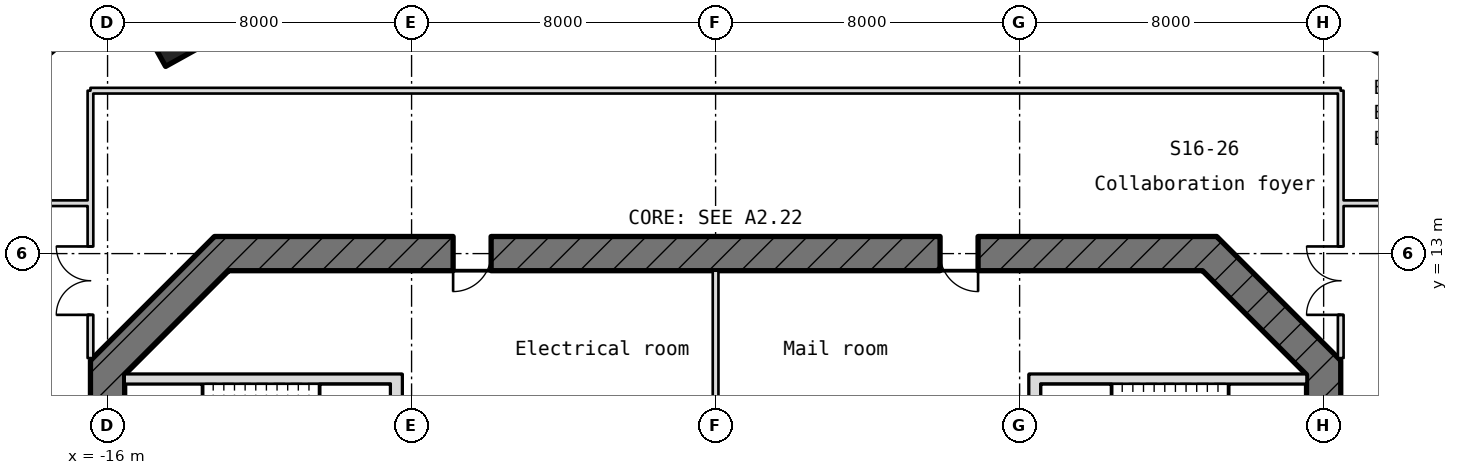
"""IFC4 building model, lengths in metres.
Left out: names, types, materials, properties, quantities, classifications, styles, units other than length and angle.
Written with IfcOpenShell. Run it as: python <this file> out.ifc"""

import sys

from ifc_helpers import new_model, si_unit, direction, frame, frame_2d, origin, origin_2d, place, context, subcontext, project, spatial, rectangle, hollow_rectangle, extrude, element, fill, save


model = new_model("IFC4")
c1 = context("Model", 3, precision=1e-05, world=origin(), true_north=direction((0.0, 1.0)))
c2 = subcontext(c1, "Body", "Model", "MODEL_VIEW")
j1 = project(units=[si_unit("LENGTHUNIT", "METRE"), si_unit("PLANEANGLEUNIT", "RADIAN")], contexts=[c1])
p1 = place(None, origin())
s1 = spatial("IfcSite", under=j1, at=p1, CompositionType="ELEMENT")
p2 = place(p1, origin())
s2 = spatial("IfcBuilding", under=s1, at=p2, CompositionType="ELEMENT")
p3 = place(p2, frame((0.0, 0.0, 235.75)))
s3 = spatial("IfcBuildingStorey", under=s2, at=p3, CompositionType="ELEMENT", Elevation=235.75)
for number, where, z_axis, x_axis in (
    (1, (17.725, 19.205, -0.18), (0.0, 0.0, 1.0), (0.874, -0.485, 0.0)),
    (2, (-14.125, 19.205, -0.18), (0.0, 0.0, 1.0), (0.874, 0.485, 0.0)),
):
    element("IfcColumn", number, at=place(p3, frame(where, z_axis=z_axis, x_axis=x_axis)), inside=s3, PredefinedType="COLUMN", context=c2, shape_type="SweptSolid", body=[
        extrude(hollow_rectangle(XDim=1.85, YDim=1.9, WallThickness=0.065, at=origin_2d()), origin(), (0.0, 0.0, 1.0), 4.15),
    ])
p4 = place(p3, frame((-15.003, 20.519, 0.0), z_axis=(0.0, 0.0, 1.0), x_axis=(-0.765786072148, -0.643095398603, 0.0)))
e3 = element("IfcWall", 3, at=p4, inside=s3, PredefinedType="SOLIDWALL", context=c2, shape_type="SweptSolid", body=[
    extrude(rectangle(XDim=10.897, YDim=0.3, at=frame_2d((5.448, 0.0))), origin(), (0.0, 0.0, 1.0), 3.97),
])
p5 = place(p4, frame((7.197, 0.0, 0.0)))
e4 = element("IfcOpeningElement", 4, at=p5, cuts=e3, PredefinedType="OPENING", context=c2, shape_type="SweptSolid", body=[
    extrude(rectangle(XDim=1.8, YDim=2.4, at=frame_2d((0.9, 1.2))), frame((0.0, 0.16, 0.0), z_axis=(0.0, -1.0, 0.0), x_axis=(1.0, 0.0, 0.0)), (0.0, 0.0, 1.0), 0.32),
])
p6 = place(p4, frame((4.597, 0.0, 0.9)))
e5 = element("IfcOpeningElement", 5, at=p6, cuts=e3, PredefinedType="OPENING", context=c2, shape_type="SweptSolid", body=[
    extrude(rectangle(XDim=2.0, YDim=1.5, at=frame_2d((1.0, 0.75))), frame((0.0, 0.16, 0.0), z_axis=(0.0, -1.0, 0.0), x_axis=(1.0, 0.0, 0.0)), (0.0, 0.0, 1.0), 0.32),
])
p7 = place(p3, frame((16.0, -10.186, -0.18), z_axis=(0.0, 0.0, 1.0), x_axis=(0.0, 1.0, 0.0)))
e6 = element("IfcWall", 6, at=p7, inside=s3, PredefinedType="SHEAR", context=c2, shape_type="SweptSolid", body=[
    extrude(rectangle(XDim=20.373, YDim=0.9, at=frame_2d((10.186, 0.0))), origin(), (0.0, 0.0, 1.0), 4.15),
])
p8 = place(p7, frame((8.986, 0.0, 0.18)))
e7 = element("IfcOpeningElement", 7, at=p8, cuts=e6, PredefinedType="OPENING", context=c2, shape_type="SweptSolid", body=[
    extrude(rectangle(XDim=2.4, YDim=2.1, at=frame_2d((1.2, 1.05))), frame((0.0, 0.46, 0.0), z_axis=(0.0, -1.0, 0.0), x_axis=(1.0, 0.0, 0.0)), (0.0, 0.0, 1.0), 0.92),
])
p9 = place(p7, frame((13.586, 0.0, 0.18)))
e8 = element("IfcOpeningElement", 8, at=p9, cuts=e6, PredefinedType="OPENING", context=c2, shape_type="SweptSolid", body=[
    extrude(rectangle(XDim=1.2, YDim=2.1, at=frame_2d((0.6, 1.05))), frame((0.0, 0.46, 0.0), z_axis=(0.0, -1.0, 0.0), x_axis=(1.0, 0.0, 0.0)), (0.0, 0.0, 1.0), 0.92),
])
p10 = place(p7, frame((2.4, 0.0, 0.18)))
e9 = element("IfcOpeningElement", 9, at=p10, cuts=e6, PredefinedType="OPENING", context=c2, shape_type="SweptSolid", body=[
    extrude(rectangle(XDim=1.2, YDim=2.1, at=frame_2d((0.6, 1.05))), frame((0.0, 0.46, 0.0), z_axis=(0.0, -1.0, 0.0), x_axis=(1.0, 0.0, 0.0)), (0.0, 0.0, 1.0), 0.92),
])
p11 = place(p3, frame((16.132, 9.868, -0.18), z_axis=(0.0, 0.0, 1.0), x_axis=(-0.707106781187, 0.707106781187, 0.0)))
e10 = element("IfcWall", 10, at=p11, inside=s3, PredefinedType="SHEAR", context=c2, shape_type="SweptSolid", body=[
    extrude(rectangle(XDim=4.615, YDim=0.9, at=frame_2d((2.308, 0.0))), origin(), (0.0, 0.0, 1.0), 4.15),
])
p12 = place(p3, frame((13.186, 13.0, -0.18), z_axis=(0.0, 0.0, 1.0), x_axis=(-1.0, 0.0, 0.0)))
e11 = element("IfcWall", 11, at=p12, inside=s3, PredefinedType="SHEAR", context=c2, shape_type="SweptSolid", body=[
    extrude(rectangle(XDim=26.373, YDim=0.9, at=frame_2d((13.186, 0.0))), origin(), (0.0, 0.0, 1.0), 4.15),
])
p13 = place(p12, frame((19.094, 0.0, 0.18)))
e12 = element("IfcOpeningElement", 12, at=p13, cuts=e11, PredefinedType="OPENING", context=c2, shape_type="SweptSolid", body=[
    extrude(rectangle(XDim=1.0, YDim=2.1, at=frame_2d((0.5, 1.05))), frame((0.0, 0.46, 0.0), z_axis=(0.0, -1.0, 0.0), x_axis=(1.0, 0.0, 0.0)), (0.0, 0.0, 1.0), 0.92),
])
p14 = place(p12, frame((6.279, 0.0, 0.18)))
e13 = element("IfcOpeningElement", 13, at=p14, cuts=e11, PredefinedType="OPENING", context=c2, shape_type="SweptSolid", body=[
    extrude(rectangle(XDim=1.0, YDim=2.1, at=frame_2d((0.5, 1.05))), frame((0.0, 0.46, 0.0), z_axis=(0.0, -1.0, 0.0), x_axis=(1.0, 0.0, 0.0)), (0.0, 0.0, 1.0), 0.92),
])
p15 = place(p3, frame((-12.868, 13.132, -0.18), z_axis=(0.0, 0.0, 1.0), x_axis=(-0.707106781187, -0.707106781187, 0.0)))
e14 = element("IfcWall", 14, at=p15, inside=s3, PredefinedType="SHEAR", context=c2, shape_type="SweptSolid", body=[
    extrude(rectangle(XDim=4.615, YDim=0.9, at=frame_2d((2.308, 0.0))), origin(), (0.0, 0.0, 1.0), 4.15),
])
p16 = place(p3, frame((-16.0, 10.186, -0.18), z_axis=(0.0, 0.0, 1.0), x_axis=(0.0, -1.0, 0.0)))
e15 = element("IfcWall", 15, at=p16, inside=s3, PredefinedType="SHEAR", context=c2, shape_type="SweptSolid", body=[
    extrude(rectangle(XDim=20.373, YDim=0.9, at=frame_2d((10.186, 0.0))), origin(), (0.0, 0.0, 1.0), 4.15),
])
p17 = place(p16, frame((8.986, 0.0, 0.18)))
e16 = element("IfcOpeningElement", 16, at=p17, cuts=e15, PredefinedType="OPENING", context=c2, shape_type="SweptSolid", body=[
    extrude(rectangle(XDim=2.4, YDim=2.1, at=frame_2d((1.2, 1.05))), frame((0.0, 0.46, 0.0), z_axis=(0.0, -1.0, 0.0), x_axis=(1.0, 0.0, 0.0)), (0.0, 0.0, 1.0), 0.92),
])
p18 = place(p16, frame((5.586, 0.0, 0.18)))
e17 = element("IfcOpeningElement", 17, at=p18, cuts=e15, PredefinedType="OPENING", context=c2, shape_type="SweptSolid", body=[
    extrude(rectangle(XDim=1.2, YDim=2.1, at=frame_2d((0.6, 1.05))), frame((0.0, 0.46, 0.0), z_axis=(0.0, -1.0, 0.0), x_axis=(1.0, 0.0, 0.0)), (0.0, 0.0, 1.0), 0.92),
])
for number, where, z_axis, x_axis in (
    (18, (-15.55, 9.7, -0.18), (0.0, 0.0, 1.0), (1.0, 0.0, 0.0)),
    (19, (8.55, 9.7, -0.18), (0.0, 0.0, 1.0), (1.0, 0.0, 0.0)),
):
    element("IfcWall", number, at=place(p3, frame(where, z_axis=z_axis, x_axis=x_axis)), inside=s3, PredefinedType="SHEAR", context=c2, shape_type="SweptSolid", body=[
        extrude(rectangle(XDim=7.0, YDim=0.25, at=frame_2d((3.5, 0.0))), origin(), (0.0, 0.0, 1.0), 4.15),
    ])
p19 = place(p3, frame((-8.4, 8.35, -0.18), z_axis=(0.0, 0.0, 1.0), x_axis=(0.0, 1.0, 0.0)))
e20 = element("IfcWall", 20, at=p19, inside=s3, PredefinedType="SHEAR", context=c2, shape_type="SweptSolid", body=[
    extrude(rectangle(XDim=1.475, YDim=0.3, at=frame_2d((0.737, 0.0))), origin(), (0.0, 0.0, 1.0), 4.15),
])
p20 = place(p3, frame((0.0, 8.46, 0.0), z_axis=(0.0, 0.0, 1.0), x_axis=(0.0, 1.0, 0.0)))
e21 = element("IfcWall", 21, at=p20, inside=s3, PredefinedType="PARTITIONING", context=c2, shape_type="SweptSolid", body=[
    extrude(rectangle(XDim=4.09, YDim=0.15, at=frame_2d((2.045, 0.0))), origin(), (0.0, 0.0, 1.0), 3.97),
])
p21 = place(p3, frame((8.4, 8.35, -0.18), z_axis=(0.0, 0.0, 1.0), x_axis=(0.0, 1.0, 0.0)))
e22 = element("IfcWall", 22, at=p21, inside=s3, PredefinedType="SHEAR", context=c2, shape_type="SweptSolid", body=[
    extrude(rectangle(XDim=1.475, YDim=0.3, at=frame_2d((0.737, 0.0))), origin(), (0.0, 0.0, 1.0), 4.15),
])
p22 = place(p3, frame((-18.85, 14.326, 0.0), z_axis=(0.0, 0.0, 1.0), x_axis=(1.0, 0.0, 0.0)))
e23 = element("IfcWall", 23, at=p22, inside=s3, PredefinedType="PARTITIONING", context=c2, shape_type="SweptSolid", body=[
    extrude(rectangle(XDim=2.4, YDim=0.15, at=frame_2d((1.2, 0.0))), origin(), (0.0, 0.0, 1.0), 3.97),
])
p23 = place(p3, frame((-16.45, 10.25, 0.0), z_axis=(0.0, 0.0, 1.0), x_axis=(0.0, 1.0, 0.0)))
e24 = element("IfcWall", 24, at=p23, inside=s3, PredefinedType="PARTITIONING", context=c2, shape_type="SweptSolid", body=[
    extrude(rectangle(XDim=7.037, YDim=0.15, at=frame_2d((3.518, 0.0))), origin(), (0.0, 0.0, 1.0), 3.97),
])
p24 = place(p23, frame((1.138, 0.0, 0.0)))
e25 = element("IfcOpeningElement", 25, at=p24, cuts=e24, PredefinedType="OPENING", context=c2, shape_type="SweptSolid", body=[
    extrude(rectangle(XDim=1.8, YDim=2.1, at=frame_2d((0.9, 1.05))), frame((0.0, 0.085, 0.0), z_axis=(0.0, -1.0, 0.0), x_axis=(1.0, 0.0, 0.0)), (0.0, 0.0, 1.0), 0.17),
])
p25 = place(p3, frame((-16.45, 17.287, 0.0), z_axis=(0.0, 0.0, 1.0), x_axis=(1.0, 0.0, 0.0)))
e26 = element("IfcWall", 26, at=p25, inside=s3, PredefinedType="PARTITIONING", context=c2, shape_type="SweptSolid", body=[
    extrude(rectangle(XDim=32.9, YDim=0.15, at=frame_2d((16.45, 0.0))), origin(), (0.0, 0.0, 1.0), 3.97),
])
p26 = place(p3, frame((16.45, 10.25, 0.0), z_axis=(0.0, 0.0, 1.0), x_axis=(0.0, 1.0, 0.0)))
e27 = element("IfcWall", 27, at=p26, inside=s3, PredefinedType="PARTITIONING", context=c2, shape_type="SweptSolid", body=[
    extrude(rectangle(XDim=7.037, YDim=0.15, at=frame_2d((3.518, 0.0))), origin(), (0.0, 0.0, 1.0), 3.97),
])
p27 = place(p26, frame((1.138, 0.0, 0.0)))
e28 = element("IfcOpeningElement", 28, at=p27, cuts=e27, PredefinedType="OPENING", context=c2, shape_type="SweptSolid", body=[
    extrude(rectangle(XDim=1.8, YDim=2.1, at=frame_2d((0.9, 1.05))), frame((0.0, 0.085, 0.0), z_axis=(0.0, -1.0, 0.0), x_axis=(1.0, 0.0, 0.0)), (0.0, 0.0, 1.0), 0.17),
])
p28 = place(p3, frame((16.45, 14.326, 0.0), z_axis=(0.0, 0.0, 1.0), x_axis=(1.0, 0.0, 0.0)))
e29 = element("IfcWall", 29, at=p28, inside=s3, PredefinedType="PARTITIONING", context=c2, shape_type="SweptSolid", body=[
    extrude(rectangle(XDim=2.4, YDim=0.15, at=frame_2d((1.2, 0.0))), origin(), (0.0, 0.0, 1.0), 3.97),
])
p29 = place(p13, origin())
e30 = element("IfcDoor", 30, at=p29, inside=s3, OperationType="SINGLE_SWING_RIGHT", PredefinedType="DOOR", context=c2, shape_type="SweptSolid", body=[
    extrude(rectangle(XDim=1.0, YDim=2.1, at=frame_2d((0.5, 1.05))), frame((0.0, 0.025, 0.0), z_axis=(0.0, -1.0, 0.0), x_axis=(1.0, 0.0, 0.0)), (0.0, 0.0, 1.0), 0.05),
])
fill(e12, e30)
p30 = place(p14, origin())
e31 = element("IfcDoor", 31, at=p30, inside=s3, OperationType="SINGLE_SWING_RIGHT", PredefinedType="DOOR", context=c2, shape_type="SweptSolid", body=[
    extrude(rectangle(XDim=1.0, YDim=2.1, at=frame_2d((0.5, 1.05))), frame((0.0, 0.025, 0.0), z_axis=(0.0, -1.0, 0.0), x_axis=(1.0, 0.0, 0.0)), (0.0, 0.0, 1.0), 0.05),
])
fill(e13, e31)
p31 = place(p24, origin())
e32 = element("IfcDoor", 32, at=p31, inside=s3, OperationType="DOUBLE_DOOR_SINGLE_SWING", PredefinedType="DOOR", context=c2, shape_type="SweptSolid", body=[
    extrude(rectangle(XDim=1.8, YDim=2.1, at=frame_2d((0.9, 1.05))), frame((0.0, 0.025, 0.0), z_axis=(0.0, -1.0, 0.0), x_axis=(1.0, 0.0, 0.0)), (0.0, 0.0, 1.0), 0.05),
])
fill(e25, e32)
p32 = place(p27, origin())
e33 = element("IfcDoor", 33, at=p32, inside=s3, OperationType="DOUBLE_DOOR_SINGLE_SWING", PredefinedType="DOOR", context=c2, shape_type="SweptSolid", body=[
    extrude(rectangle(XDim=1.8, YDim=2.1, at=frame_2d((0.9, 1.05))), frame((0.0, 0.025, 0.0), z_axis=(0.0, -1.0, 0.0), x_axis=(1.0, 0.0, 0.0)), (0.0, 0.0, 1.0), 0.05),
])
fill(e28, e33)
save(model, sys.argv[1])
